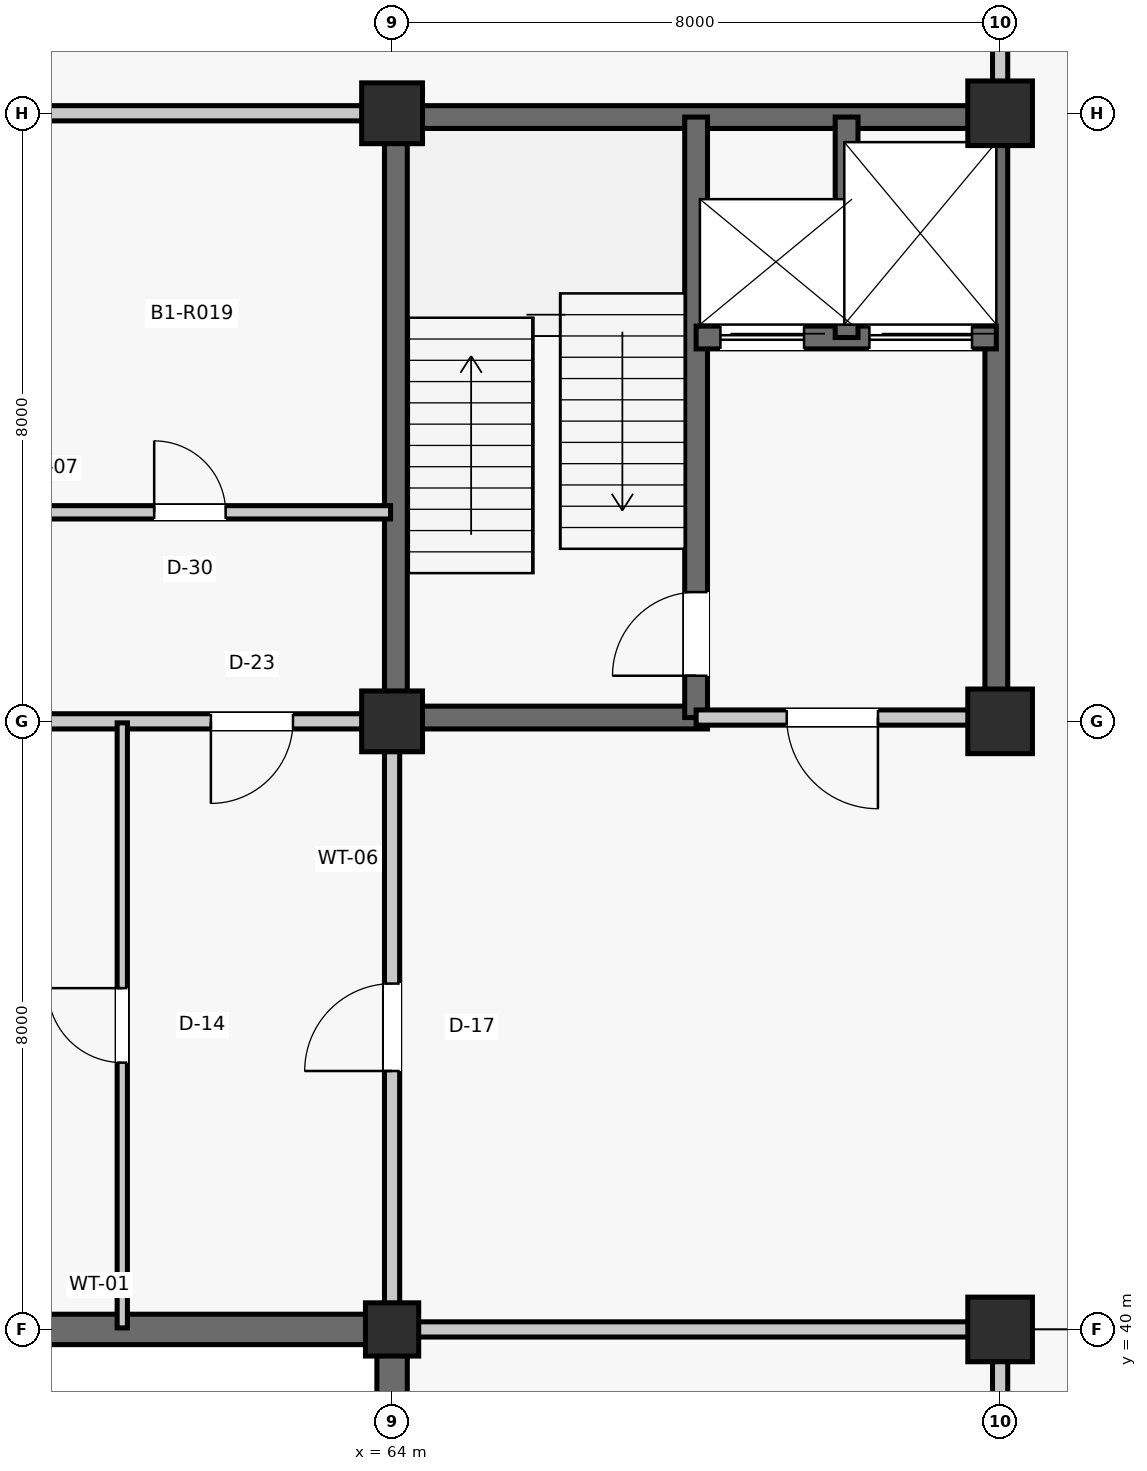
"""IFC4 building model, lengths in metres.
Left out: names, types, materials, properties, quantities, classifications, styles, units other than length and angle.
Written with IfcOpenShell. Run it as: python <this file> out.ifc"""

import sys

from ifc_helpers import new_model, si_unit, direction, frame, frame_2d, origin, origin_2d, place, context, subcontext, project, spatial, rectangle, extrude, element, fill, save


model = new_model("IFC4")
c1 = context("Model", 3, precision=1e-05, world=origin(), true_north=direction((0.0, 1.0)))
c2 = subcontext(c1, "Body", "Model", "MODEL_VIEW")
j1 = project(units=[si_unit("LENGTHUNIT", "METRE"), si_unit("PLANEANGLEUNIT", "RADIAN")], contexts=[c1])
p1 = place(None, origin())
s1 = spatial("IfcSite", under=j1, at=p1, CompositionType="ELEMENT")
p2 = place(p1, origin())
s2 = spatial("IfcBuilding", under=s1, at=p2, CompositionType="ELEMENT")
p3 = place(p2, frame((0.0, 0.0, -4.29)))
s3 = spatial("IfcBuildingStorey", under=s2, at=p3, CompositionType="ELEMENT", Elevation=-4.29)
p4 = place(p3, frame((64.0, 40.0, 0.0), z_axis=(0.0, 0.0, 1.0), x_axis=(1.0, 0.0, 0.0)))
e1 = element("IfcColumn", 1, at=p4, inside=s3, PredefinedType="COLUMN", context=c2, shape_type="SweptSolid", body=[
    extrude(rectangle(XDim=0.7, YDim=0.7, at=origin_2d()), origin(), (0.0, 0.0, 1.0), 4.29),
])
for number, where, z_axis, x_axis in (
    (2, (64.0, 48.0, 0.0), (0.0, 0.0, 1.0), (1.0, 0.0, 0.0)),
    (3, (64.0, 56.0, 0.0), (0.0, 0.0, 1.0), (1.0, 0.0, 0.0)),
):
    element("IfcColumn", number, at=place(p3, frame(where, z_axis=z_axis, x_axis=x_axis)), inside=s3, PredefinedType="COLUMN", context=c2, shape_type="SweptSolid", body=[
        extrude(rectangle(XDim=0.8, YDim=0.8, at=origin_2d()), origin(), (0.0, 0.0, 1.0), 4.29),
    ])
for number, where, z_axis, x_axis in (
    (4, (72.0, 40.0, 0.0), (0.0, 0.0, 1.0), (1.0, 0.0, 0.0)),
    (5, (72.0, 48.0, 0.0), (0.0, 0.0, 1.0), (1.0, 0.0, 0.0)),
    (6, (72.0, 56.0, 0.0), (0.0, 0.0, 1.0), (1.0, 0.0, 0.0)),
):
    element("IfcColumn", number, at=place(p3, frame(where, z_axis=z_axis, x_axis=x_axis)), inside=s3, PredefinedType="COLUMN", context=c2, shape_type="SweptSolid", body=[
        extrude(rectangle(XDim=0.85, YDim=0.85, at=origin_2d()), origin(), (0.0, 0.0, 1.0), 4.29),
    ])
p5 = place(p3, frame((56.335, 40.0, 0.0), z_axis=(0.0, 0.0, 1.0), x_axis=(1.0, 0.0, 0.0)))
e7 = element("IfcWall", 7, at=p5, inside=s3, PredefinedType="SHEAR", context=c2, shape_type="SweptSolid", body=[
    extrude(rectangle(XDim=7.33, YDim=0.4, at=frame_2d((3.665, 0.0))), origin(), (0.0, 0.0, 1.0), 3.324),
])
p6 = place(p3, frame((64.0, 32.335, 0.0), z_axis=(0.0, 0.0, 1.0), x_axis=(0.0, 1.0, 0.0)))
e8 = element("IfcWall", 8, at=p6, inside=s3, PredefinedType="SHEAR", context=c2, shape_type="SweptSolid", body=[
    extrude(rectangle(XDim=7.33, YDim=0.4, at=frame_2d((3.665, 0.0))), origin(), (0.0, 0.0, 1.0), 3.4),
])
p7 = place(p3, frame((64.05, 48.29, 0.0), z_axis=(0.0, 0.0, 1.0), x_axis=(0.0, 1.0, 0.0)))
e9 = element("IfcWall", 9, at=p7, inside=s3, PredefinedType="SHEAR", context=c2, shape_type="SweptSolid", body=[
    extrude(rectangle(XDim=7.42, YDim=0.3, at=frame_2d((3.71, 0.0))), origin(), (0.0, 0.0, 1.0), 4.015),
])
p8 = place(p3, frame((64.29, 55.95, 0.0), z_axis=(0.0, 0.0, 1.0), x_axis=(1.0, 0.0, 0.0)))
e10 = element("IfcWall", 10, at=p8, inside=s3, PredefinedType="SHEAR", context=c2, shape_type="SweptSolid", body=[
    extrude(rectangle(XDim=7.395, YDim=0.3, at=frame_2d((3.698, 0.0))), origin(), (0.0, 0.0, 1.0), 4.015),
])
p9 = place(p3, frame((71.95, 48.315, 0.0), z_axis=(0.0, 0.0, 1.0), x_axis=(0.0, 1.0, 0.0)))
e11 = element("IfcWall", 11, at=p9, inside=s3, PredefinedType="SHEAR", context=c2, shape_type="SweptSolid", body=[
    extrude(rectangle(XDim=7.37, YDim=0.3, at=frame_2d((3.685, 0.0))), origin(), (0.0, 0.0, 1.0), 4.015),
])
p10 = place(p3, frame((64.29, 48.05, 0.0), z_axis=(0.0, 0.0, 1.0), x_axis=(1.0, 0.0, 0.0)))
e12 = element("IfcWall", 12, at=p10, inside=s3, PredefinedType="SHEAR", context=c2, shape_type="SweptSolid", body=[
    extrude(rectangle(XDim=3.86, YDim=0.3, at=frame_2d((1.93, 0.0))), origin(), (0.0, 0.0, 1.0), 4.015),
])
p11 = place(p3, frame((68.0, 48.05, 0.0), z_axis=(0.0, 0.0, 1.0), x_axis=(0.0, 1.0, 0.0)))
e13 = element("IfcWall", 13, at=p11, inside=s3, PredefinedType="SHEAR", context=c2, shape_type="SweptSolid", body=[
    extrude(rectangle(XDim=7.9, YDim=0.3, at=frame_2d((3.95, 0.0))), origin(), (0.0, 0.0, 1.0), 4.015),
])
p12 = place(p11, frame((0.55, 0.0, 0.0)))
e14 = element("IfcOpeningElement", 14, at=p12, cuts=e13, PredefinedType="OPENING", context=c2, shape_type="SweptSolid", body=[
    extrude(rectangle(XDim=1.1, YDim=2.15, at=frame_2d((0.55, 1.075))), frame((0.0, 0.16, 0.0), z_axis=(0.0, -1.0, 0.0), x_axis=(1.0, 0.0, 0.0)), (0.0, 0.0, 1.0), 0.32),
])
p13 = place(p3, frame((68.0, 53.05, 0.0), z_axis=(0.0, 0.0, 1.0), x_axis=(1.0, 0.0, 0.0)))
e15 = element("IfcWall", 15, at=p13, inside=s3, PredefinedType="SHEAR", context=c2, shape_type="SweptSolid", body=[
    extrude(rectangle(XDim=3.95, YDim=0.3, at=frame_2d((1.975, 0.0))), origin(), (0.0, 0.0, 1.0), 4.015),
])
p14 = place(p13, frame((0.32, 0.0, 0.0)))
e16 = element("IfcOpeningElement", 16, at=p14, cuts=e15, PredefinedType="OPENING", context=c2, shape_type="SweptSolid", body=[
    extrude(rectangle(XDim=1.1, YDim=2.2, at=frame_2d((0.55, 1.1))), frame((0.0, 0.16, 0.0), z_axis=(0.0, -1.0, 0.0), x_axis=(1.0, 0.0, 0.0)), (0.0, 0.0, 1.0), 0.32),
])
p15 = place(p13, frame((2.28, 0.0, 0.0)))
e17 = element("IfcOpeningElement", 17, at=p15, cuts=e15, PredefinedType="OPENING", context=c2, shape_type="SweptSolid", body=[
    extrude(rectangle(XDim=1.35, YDim=2.3, at=frame_2d((0.675, 1.15))), frame((0.0, 0.16, 0.0), z_axis=(0.0, -1.0, 0.0), x_axis=(1.0, 0.0, 0.0)), (0.0, 0.0, 1.0), 0.32),
])
p16 = place(p3, frame((69.98, 53.05, 0.0), z_axis=(0.0, 0.0, 1.0), x_axis=(0.0, 1.0, 0.0)))
e18 = element("IfcWall", 18, at=p16, inside=s3, PredefinedType="SHEAR", context=c2, shape_type="SweptSolid", body=[
    extrude(rectangle(XDim=2.9, YDim=0.3, at=frame_2d((1.45, 0.0))), origin(), (0.0, 0.0, 1.0), 4.015),
])
p17 = place(p3, frame((68.0, 48.05, 0.0), z_axis=(0.0, 0.0, 1.0), x_axis=(1.0, 0.0, 0.0)))
e19 = element("IfcWall", 19, at=p17, inside=s3, PredefinedType="PARTITIONING", context=c2, shape_type="SweptSolid", body=[
    extrude(rectangle(XDim=3.585, YDim=0.2, at=frame_2d((1.792, 0.0))), origin(), (0.0, 0.0, 1.0), 3.326),
])
p18 = place(p17, frame((1.192, 0.0, 0.0)))
e20 = element("IfcOpeningElement", 20, at=p18, cuts=e19, PredefinedType="OPENING", context=c2, shape_type="SweptSolid", body=[
    extrude(rectangle(XDim=1.2, YDim=2.15, at=frame_2d((0.6, 1.075))), frame((0.0, 0.11, 0.0), z_axis=(0.0, -1.0, 0.0), x_axis=(1.0, 0.0, 0.0)), (0.0, 0.0, 1.0), 0.22),
])
p19 = place(p3, frame((58.7, 50.75, 0.0), z_axis=(0.0, 0.0, 1.0), x_axis=(1.0, 0.0, 0.0)))
e21 = element("IfcWall", 21, at=p19, inside=s3, PredefinedType="PARTITIONING", context=c2, shape_type="SweptSolid", body=[
    extrude(rectangle(XDim=5.28, YDim=0.175, at=frame_2d((2.64, 0.0))), origin(), (0.0, 0.0, 1.0), 3.394),
])
p20 = place(p19, frame((2.17, 0.0, 0.0)))
e22 = element("IfcOpeningElement", 22, at=p20, cuts=e21, PredefinedType="OPENING", context=c2, shape_type="SweptSolid", body=[
    extrude(rectangle(XDim=0.94, YDim=2.12, at=frame_2d((0.47, 1.06))), frame((0.0, 0.097, 0.0), z_axis=(0.0, -1.0, 0.0), x_axis=(1.0, 0.0, 0.0)), (0.0, 0.0, 1.0), 0.195),
])
p21 = place(p3, frame((64.0, 40.34, 0.0), z_axis=(0.0, 0.0, 1.0), x_axis=(0.0, 1.0, 0.0)))
e23 = element("IfcWall", 23, at=p21, inside=s3, PredefinedType="PARTITIONING", context=c2, shape_type="SweptSolid", body=[
    extrude(rectangle(XDim=7.27, YDim=0.2, at=frame_2d((3.635, 0.0))), origin(), (0.0, 0.0, 1.0), 3.402),
])
p22 = place(p21, frame((3.06, 0.0, 0.0)))
e24 = element("IfcOpeningElement", 24, at=p22, cuts=e23, PredefinedType="OPENING", context=c2, shape_type="SweptSolid", body=[
    extrude(rectangle(XDim=1.15, YDim=2.15, at=frame_2d((0.575, 1.075))), frame((0.0, 0.11, 0.0), z_axis=(0.0, -1.0, 0.0), x_axis=(1.0, 0.0, 0.0)), (0.0, 0.0, 1.0), 0.22),
])
p23 = place(p3, frame((56.34, 48.0, 0.0), z_axis=(0.0, 0.0, 1.0), x_axis=(1.0, 0.0, 0.0)))
e25 = element("IfcWall", 25, at=p23, inside=s3, PredefinedType="PARTITIONING", context=c2, shape_type="SweptSolid", body=[
    extrude(rectangle(XDim=7.27, YDim=0.2, at=frame_2d((3.635, 0.0))), origin(), (0.0, 0.0, 1.0), 3.393),
])
p24 = place(p23, frame((1.278, 0.0, 0.0)))
e26 = element("IfcOpeningElement", 26, at=p24, cuts=e25, PredefinedType="OPENING", context=c2, shape_type="SweptSolid", body=[
    extrude(rectangle(XDim=1.08, YDim=2.2, at=frame_2d((0.54, 1.1))), frame((0.0, 0.11, 0.0), z_axis=(0.0, -1.0, 0.0), x_axis=(1.0, 0.0, 0.0)), (0.0, 0.0, 1.0), 0.22),
])
p25 = place(p23, frame((5.276, 0.0, 0.0)))
e27 = element("IfcOpeningElement", 27, at=p25, cuts=e25, PredefinedType="OPENING", context=c2, shape_type="SweptSolid", body=[
    extrude(rectangle(XDim=1.08, YDim=2.2, at=frame_2d((0.54, 1.1))), frame((0.0, 0.11, 0.0), z_axis=(0.0, -1.0, 0.0), x_axis=(1.0, 0.0, 0.0)), (0.0, 0.0, 1.0), 0.22),
])
p26 = place(p3, frame((56.34, 56.0, 0.0), z_axis=(0.0, 0.0, 1.0), x_axis=(1.0, 0.0, 0.0)))
e28 = element("IfcWall", 28, at=p26, inside=s3, PredefinedType="PARTITIONING", context=c2, shape_type="SweptSolid", body=[
    extrude(rectangle(XDim=7.27, YDim=0.2, at=frame_2d((3.635, 0.0))), origin(), (0.0, 0.0, 1.0), 3.326),
])
p27 = place(p26, frame((0.52, 0.0, 0.0)))
e29 = element("IfcOpeningElement", 29, at=p27, cuts=e28, PredefinedType="OPENING", context=c2, shape_type="SweptSolid", body=[
    extrude(rectangle(XDim=0.94, YDim=2.12, at=frame_2d((0.47, 1.06))), frame((0.0, 0.11, 0.0), z_axis=(0.0, -1.0, 0.0), x_axis=(1.0, 0.0, 0.0)), (0.0, 0.0, 1.0), 0.22),
])
p28 = place(p3, frame((72.0, 32.415, 0.0), z_axis=(0.0, 0.0, 1.0), x_axis=(0.0, 1.0, 0.0)))
e30 = element("IfcWall", 30, at=p28, inside=s3, PredefinedType="PARTITIONING", context=c2, shape_type="SweptSolid", body=[
    extrude(rectangle(XDim=7.17, YDim=0.2, at=frame_2d((3.585, 0.0))), origin(), (0.0, 0.0, 1.0), 3.402),
])
p29 = place(p28, frame((2.835, 0.0, 0.0)))
e31 = element("IfcOpeningElement", 31, at=p29, cuts=e30, PredefinedType="OPENING", context=c2, shape_type="SweptSolid", body=[
    extrude(rectangle(XDim=1.5, YDim=2.25, at=frame_2d((0.75, 1.125))), frame((0.0, 0.11, 0.0), z_axis=(0.0, -1.0, 0.0), x_axis=(1.0, 0.0, 0.0)), (0.0, 0.0, 1.0), 0.22),
])
p30 = place(p3, frame((64.34, 40.0, 0.0), z_axis=(0.0, 0.0, 1.0), x_axis=(1.0, 0.0, 0.0)))
e32 = element("IfcWall", 32, at=p30, inside=s3, PredefinedType="PARTITIONING", context=c2, shape_type="SweptSolid", body=[
    extrude(rectangle(XDim=7.245, YDim=0.2, at=frame_2d((3.623, 0.0))), origin(), (0.0, 0.0, 1.0), 3.393),
])
p31 = place(p3, frame((72.0, 56.415, 0.0), z_axis=(0.0, 0.0, 1.0), x_axis=(0.0, 1.0, 0.0)))
e33 = element("IfcWall", 33, at=p31, inside=s3, PredefinedType="PARTITIONING", context=c2, shape_type="SweptSolid", body=[
    extrude(rectangle(XDim=7.17, YDim=0.2, at=frame_2d((3.585, 0.0))), origin(), (0.0, 0.0, 1.0), 3.393),
])
p32 = place(p31, frame((2.935, 0.0, 0.0)))
e34 = element("IfcOpeningElement", 34, at=p32, cuts=e33, PredefinedType="OPENING", context=c2, shape_type="SweptSolid", body=[
    extrude(rectangle(XDim=1.3, YDim=2.2, at=frame_2d((0.65, 1.1))), frame((0.0, 0.11, 0.0), z_axis=(0.0, -1.0, 0.0), x_axis=(1.0, 0.0, 0.0)), (0.0, 0.0, 1.0), 0.22),
])
p33 = place(p3, frame((60.45, 40.02, 0.0), z_axis=(0.0, 0.0, 1.0), x_axis=(0.0, 1.0, 0.0)))
e35 = element("IfcWall", 35, at=p33, inside=s3, PredefinedType="PARTITIONING", context=c2, shape_type="SweptSolid", body=[
    extrude(rectangle(XDim=7.96, YDim=0.135, at=frame_2d((3.98, 0.0))), origin(), (0.0, 0.0, 1.0), 3.317),
])
p34 = place(p33, frame((3.49, 0.0, 0.0)))
e36 = element("IfcOpeningElement", 36, at=p34, cuts=e35, PredefinedType="OPENING", context=c2, shape_type="SweptSolid", body=[
    extrude(rectangle(XDim=0.98, YDim=2.15, at=frame_2d((0.49, 1.075))), frame((0.0, 0.077, 0.0), z_axis=(0.0, -1.0, 0.0), x_axis=(1.0, 0.0, 0.0)), (0.0, 0.0, 1.0), 0.155),
])
p35 = place(p12, origin())
e37 = element("IfcDoor", 37, at=p35, inside=s3, OperationType="SINGLE_SWING_LEFT", PredefinedType="DOOR", context=c2, shape_type="SweptSolid", body=[
    extrude(rectangle(XDim=1.1, YDim=2.15, at=frame_2d((0.55, 1.075))), frame((0.0, 0.025, 0.0), z_axis=(0.0, -1.0, 0.0), x_axis=(1.0, 0.0, 0.0)), (0.0, 0.0, 1.0), 0.05),
])
fill(e14, e37)
p36 = place(p14, origin())
e38 = element("IfcDoor", 38, at=p36, inside=s3, OperationType="SLIDING_TO_LEFT", PredefinedType="DOOR", context=c2, shape_type="SweptSolid", body=[
    extrude(rectangle(XDim=1.1, YDim=2.2, at=frame_2d((0.55, 1.1))), frame((0.0, 0.025, 0.0), z_axis=(0.0, -1.0, 0.0), x_axis=(1.0, 0.0, 0.0)), (0.0, 0.0, 1.0), 0.05),
])
fill(e16, e38)
p37 = place(p15, origin())
e39 = element("IfcDoor", 39, at=p37, inside=s3, OperationType="DOUBLE_DOOR_SLIDING", PredefinedType="DOOR", context=c2, shape_type="SweptSolid", body=[
    extrude(rectangle(XDim=1.35, YDim=2.3, at=frame_2d((0.675, 1.15))), frame((0.0, 0.025, 0.0), z_axis=(0.0, -1.0, 0.0), x_axis=(1.0, 0.0, 0.0)), (0.0, 0.0, 1.0), 0.05),
])
fill(e17, e39)
p38 = place(p18, frame((1.2, 0.0, 0.0), z_axis=(0.0, 0.0, 1.0), x_axis=(-1.0, 0.0, 0.0)))
e40 = element("IfcDoor", 40, at=p38, inside=s3, OperationType="SINGLE_SWING_RIGHT", PredefinedType="DOOR", context=c2, shape_type="SweptSolid", body=[
    extrude(rectangle(XDim=1.2, YDim=2.15, at=frame_2d((0.6, 1.075))), frame((0.0, 0.025, 0.0), z_axis=(0.0, -1.0, 0.0), x_axis=(1.0, 0.0, 0.0)), (0.0, 0.0, 1.0), 0.05),
])
fill(e20, e40)
p39 = place(p20, origin())
e41 = element("IfcDoor", 41, at=p39, inside=s3, OperationType="SINGLE_SWING_LEFT", PredefinedType="DOOR", context=c2, shape_type="SweptSolid", body=[
    extrude(rectangle(XDim=0.94, YDim=2.12, at=frame_2d((0.47, 1.06))), frame((0.0, 0.025, 0.0), z_axis=(0.0, -1.0, 0.0), x_axis=(1.0, 0.0, 0.0)), (0.0, 0.0, 1.0), 0.05),
])
fill(e22, e41)
p40 = place(p22, origin())
e42 = element("IfcDoor", 42, at=p40, inside=s3, OperationType="SINGLE_SWING_LEFT", PredefinedType="DOOR", context=c2, shape_type="SweptSolid", body=[
    extrude(rectangle(XDim=1.15, YDim=2.15, at=frame_2d((0.575, 1.075))), frame((0.0, 0.025, 0.0), z_axis=(0.0, -1.0, 0.0), x_axis=(1.0, 0.0, 0.0)), (0.0, 0.0, 1.0), 0.05),
])
fill(e24, e42)
p41 = place(p25, frame((1.08, 0.0, 0.0), z_axis=(0.0, 0.0, 1.0), x_axis=(-1.0, 0.0, 0.0)))
e43 = element("IfcDoor", 43, at=p41, inside=s3, OperationType="SINGLE_SWING_LEFT", PredefinedType="DOOR", context=c2, shape_type="SweptSolid", body=[
    extrude(rectangle(XDim=1.08, YDim=2.2, at=frame_2d((0.54, 1.1))), frame((0.0, 0.025, 0.0), z_axis=(0.0, -1.0, 0.0), x_axis=(1.0, 0.0, 0.0)), (0.0, 0.0, 1.0), 0.05),
])
fill(e27, e43)
p42 = place(p34, origin())
e44 = element("IfcDoor", 44, at=p42, inside=s3, OperationType="SINGLE_SWING_RIGHT", PredefinedType="DOOR", context=c2, shape_type="SweptSolid", body=[
    extrude(rectangle(XDim=0.98, YDim=2.15, at=frame_2d((0.49, 1.075))), frame((0.0, 0.025, 0.0), z_axis=(0.0, -1.0, 0.0), x_axis=(1.0, 0.0, 0.0)), (0.0, 0.0, 1.0), 0.05),
])
fill(e36, e44)
save(model, sys.argv[1])
